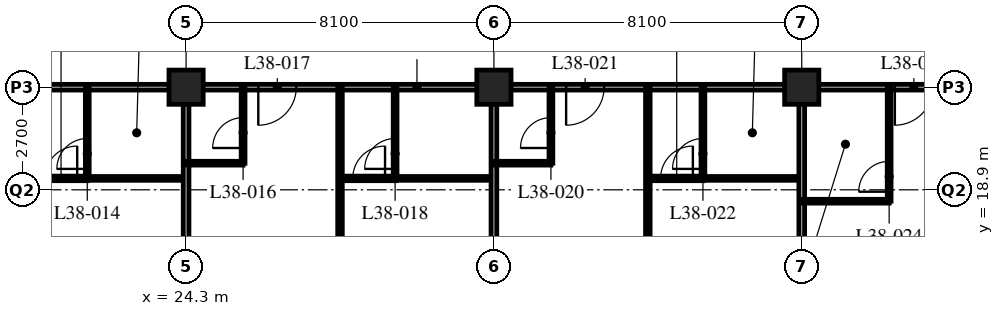
"""IFC4 building model, lengths in metres.
Left out: names, types, materials, properties, quantities, classifications, styles, units other than length and angle.
Written with IfcOpenShell. Run it as: python <this file> out.ifc"""

import sys

from ifc_helpers import new_model, si_unit, direction, frame, frame_2d, origin, origin_2d, place, context, subcontext, project, spatial, rectangle, hollow_rectangle, extrude, element, fill, save


model = new_model("IFC4")
c1 = context("Model", 3, precision=1e-05, world=origin(), true_north=direction((0.0, 1.0)))
c2 = subcontext(c1, "Body", "Model", "MODEL_VIEW")
j1 = project(units=[si_unit("LENGTHUNIT", "METRE"), si_unit("PLANEANGLEUNIT", "RADIAN")], contexts=[c1])
p1 = place(None, origin())
s1 = spatial("IfcSite", under=j1, at=p1, CompositionType="ELEMENT")
p2 = place(p1, origin())
s2 = spatial("IfcBuilding", under=s1, at=p2, CompositionType="ELEMENT")
p3 = place(p2, frame((0.0, 0.0, 147.6)))
s3 = spatial("IfcBuildingStorey", under=s2, at=p3, CompositionType="ELEMENT", Elevation=147.6)
for number, where, z_axis, x_axis in (
    (1, (24.3, 21.6, 0.0), (0.0, 0.0, 1.0), (1.0, 0.0, 0.0)),
    (2, (32.4, 21.6, 0.0), (0.0, 0.0, 1.0), (1.0, 0.0, 0.0)),
    (3, (40.5, 21.6, 0.0), (0.0, 0.0, 1.0), (1.0, 0.0, 0.0)),
):
    element("IfcColumn", number, at=place(p3, frame(where, z_axis=z_axis, x_axis=x_axis)), inside=s3, PredefinedType="COLUMN", context=c2, shape_type="SweptSolid", body=[
        extrude(hollow_rectangle(XDim=0.9, YDim=0.9, WallThickness=0.1, at=origin_2d()), origin(), (0.0, 0.0, 1.0), 3.4),
    ])
p4 = place(p3, frame((12.15, 21.6, 0.0), z_axis=(0.0, 0.0, 1.0), x_axis=(1.0, 0.0, 0.0)))
e4 = element("IfcWall", 4, at=p4, inside=s3, PredefinedType="PARTITIONING", context=c2, shape_type="SweptSolid", body=[
    extrude(rectangle(XDim=36.45, YDim=0.15, at=frame_2d((18.225, 0.0))), origin(), (0.0, 0.0, 1.0), 2.42),
])
p5 = place(p4, frame((5.95, 0.0, 0.0)))
e5 = element("IfcOpeningElement", 5, at=p5, cuts=e4, PredefinedType="OPENING", context=c2, shape_type="SweptSolid", body=[
    extrude(rectangle(XDim=1.0, YDim=2.1, at=frame_2d((0.5, 1.05))), frame((0.0, 0.085, 0.0), z_axis=(0.0, -1.0, 0.0), x_axis=(1.0, 0.0, 0.0)), (0.0, 0.0, 1.0), 0.17),
])
p6 = place(p4, frame((14.05, 0.0, 0.0)))
e6 = element("IfcOpeningElement", 6, at=p6, cuts=e4, PredefinedType="OPENING", context=c2, shape_type="SweptSolid", body=[
    extrude(rectangle(XDim=1.0, YDim=2.1, at=frame_2d((0.5, 1.05))), frame((0.0, 0.085, 0.0), z_axis=(0.0, -1.0, 0.0), x_axis=(1.0, 0.0, 0.0)), (0.0, 0.0, 1.0), 0.17),
])
p7 = place(p4, frame((22.15, 0.0, 0.0)))
e7 = element("IfcOpeningElement", 7, at=p7, cuts=e4, PredefinedType="OPENING", context=c2, shape_type="SweptSolid", body=[
    extrude(rectangle(XDim=1.0, YDim=2.1, at=frame_2d((0.5, 1.05))), frame((0.0, 0.085, 0.0), z_axis=(0.0, -1.0, 0.0), x_axis=(1.0, 0.0, 0.0)), (0.0, 0.0, 1.0), 0.17),
])
p8 = place(p4, frame((30.8, 0.0, 0.0)))
e8 = element("IfcOpeningElement", 8, at=p8, cuts=e4, PredefinedType="OPENING", context=c2, shape_type="SweptSolid", body=[
    extrude(rectangle(XDim=1.0, YDim=2.1, at=frame_2d((0.5, 1.05))), frame((0.0, 0.085, 0.0), z_axis=(0.0, -1.0, 0.0), x_axis=(1.0, 0.0, 0.0)), (0.0, 0.0, 1.0), 0.17),
])
p9 = place(p4, frame((1.525, 0.0, 0.0)))
e9 = element("IfcOpeningElement", 9, at=p9, cuts=e4, PredefinedType="OPENING", context=c2, shape_type="SweptSolid", body=[
    extrude(rectangle(XDim=1.0, YDim=2.1, at=frame_2d((0.5, 1.05))), frame((0.0, 0.085, 0.0), z_axis=(0.0, -1.0, 0.0), x_axis=(1.0, 0.0, 0.0)), (0.0, 0.0, 1.0), 0.17),
])
p10 = place(p4, frame((33.925, 0.0, 0.0)))
e10 = element("IfcOpeningElement", 10, at=p10, cuts=e4, PredefinedType="OPENING", context=c2, shape_type="SweptSolid", body=[
    extrude(rectangle(XDim=1.0, YDim=2.1, at=frame_2d((0.5, 1.05))), frame((0.0, 0.085, 0.0), z_axis=(0.0, -1.0, 0.0), x_axis=(1.0, 0.0, 0.0)), (0.0, 0.0, 1.0), 0.17),
])
p11 = place(p3, frame((21.7, 19.2, 0.0), z_axis=(0.0, 0.0, 1.0), x_axis=(1.0, 0.0, 0.0)))
e11 = element("IfcWall", 11, at=p11, inside=s3, PredefinedType="PARTITIONING", context=c2, shape_type="SweptSolid", body=[
    extrude(rectangle(XDim=2.6, YDim=0.1, at=frame_2d((1.3, 0.0))), origin(), (0.0, 0.0, 1.0), 3.19),
])
p12 = place(p3, frame((21.7, 21.6, 0.0), z_axis=(0.0, 0.0, 1.0), x_axis=(0.0, -1.0, 0.0)))
e12 = element("IfcWall", 12, at=p12, inside=s3, PredefinedType="PARTITIONING", context=c2, shape_type="SweptSolid", body=[
    extrude(rectangle(XDim=2.4, YDim=0.1, at=frame_2d((1.2, 0.0))), origin(), (0.0, 0.0, 1.0), 3.19),
])
p13 = place(p12, frame((1.35, 0.0, 0.0)))
e13 = element("IfcOpeningElement", 13, at=p13, cuts=e12, PredefinedType="OPENING", context=c2, shape_type="SweptSolid", body=[
    extrude(rectangle(XDim=0.8, YDim=2.1, at=frame_2d((0.4, 1.05))), frame((0.0, 0.06, 0.0), z_axis=(0.0, -1.0, 0.0), x_axis=(1.0, 0.0, 0.0)), (0.0, 0.0, 1.0), 0.12),
])
p14 = place(p3, frame((24.3, 21.6, 0.0), z_axis=(0.0, 0.0, 1.0), x_axis=(0.0, -1.0, 0.0)))
e14 = element("IfcWall", 14, at=p14, inside=s3, PredefinedType="PARTITIONING", context=c2, shape_type="SweptSolid", body=[
    extrude(rectangle(XDim=15.9, YDim=0.15, at=frame_2d((7.95, 0.0))), origin(), (0.0, 0.0, 1.0), 2.42),
])
p15 = place(p3, frame((24.3, 19.6, 0.0), z_axis=(0.0, 0.0, 1.0), x_axis=(1.0, 0.0, 0.0)))
e15 = element("IfcWall", 15, at=p15, inside=s3, PredefinedType="PARTITIONING", context=c2, shape_type="SweptSolid", body=[
    extrude(rectangle(XDim=1.5, YDim=0.1, at=frame_2d((0.75, 0.0))), origin(), (0.0, 0.0, 1.0), 3.19),
])
p16 = place(p3, frame((25.8, 21.6, 0.0), z_axis=(0.0, 0.0, 1.0), x_axis=(0.0, -1.0, 0.0)))
e16 = element("IfcWall", 16, at=p16, inside=s3, PredefinedType="PARTITIONING", context=c2, shape_type="SweptSolid", body=[
    extrude(rectangle(XDim=2.0, YDim=0.1, at=frame_2d((1.0, 0.0))), origin(), (0.0, 0.0, 1.0), 3.19),
])
p17 = place(p16, frame((0.8, 0.0, 0.0)))
e17 = element("IfcOpeningElement", 17, at=p17, cuts=e16, PredefinedType="OPENING", context=c2, shape_type="SweptSolid", body=[
    extrude(rectangle(XDim=0.8, YDim=2.1, at=frame_2d((0.4, 1.05))), frame((0.0, 0.06, 0.0), z_axis=(0.0, -1.0, 0.0), x_axis=(1.0, 0.0, 0.0)), (0.0, 0.0, 1.0), 0.12),
])
p18 = place(p3, frame((29.8, 19.2, 0.0), z_axis=(0.0, 0.0, 1.0), x_axis=(1.0, 0.0, 0.0)))
e18 = element("IfcWall", 18, at=p18, inside=s3, PredefinedType="PARTITIONING", context=c2, shape_type="SweptSolid", body=[
    extrude(rectangle(XDim=2.6, YDim=0.1, at=frame_2d((1.3, 0.0))), origin(), (0.0, 0.0, 1.0), 3.19),
])
p19 = place(p3, frame((29.8, 21.6, 0.0), z_axis=(0.0, 0.0, 1.0), x_axis=(0.0, -1.0, 0.0)))
e19 = element("IfcWall", 19, at=p19, inside=s3, PredefinedType="PARTITIONING", context=c2, shape_type="SweptSolid", body=[
    extrude(rectangle(XDim=2.4, YDim=0.1, at=frame_2d((1.2, 0.0))), origin(), (0.0, 0.0, 1.0), 3.19),
])
p20 = place(p19, frame((1.35, 0.0, 0.0)))
e20 = element("IfcOpeningElement", 20, at=p20, cuts=e19, PredefinedType="OPENING", context=c2, shape_type="SweptSolid", body=[
    extrude(rectangle(XDim=0.8, YDim=2.1, at=frame_2d((0.4, 1.05))), frame((0.0, 0.06, 0.0), z_axis=(0.0, -1.0, 0.0), x_axis=(1.0, 0.0, 0.0)), (0.0, 0.0, 1.0), 0.12),
])
p21 = place(p3, frame((28.35, 21.6, 0.0), z_axis=(0.0, 0.0, 1.0), x_axis=(0.0, -1.0, 0.0)))
e21 = element("IfcWall", 21, at=p21, inside=s3, PredefinedType="PARTITIONING", context=c2, shape_type="SweptSolid", body=[
    extrude(rectangle(XDim=15.9, YDim=0.12, at=frame_2d((7.95, 0.0))), origin(), (0.0, 0.0, 1.0), 3.19),
])
p22 = place(p21, frame((8.875, 0.0, 0.0)))
e22 = element("IfcOpeningElement", 22, at=p22, cuts=e21, PredefinedType="OPENING", context=c2, shape_type="SweptSolid", body=[
    extrude(rectangle(XDim=0.85, YDim=2.1, at=frame_2d((0.425, 1.05))), frame((0.0, 0.07, 0.0), z_axis=(0.0, -1.0, 0.0), x_axis=(1.0, 0.0, 0.0)), (0.0, 0.0, 1.0), 0.14),
])
p23 = place(p3, frame((32.4, 21.6, 0.0), z_axis=(0.0, 0.0, 1.0), x_axis=(0.0, -1.0, 0.0)))
e23 = element("IfcWall", 23, at=p23, inside=s3, PredefinedType="PARTITIONING", context=c2, shape_type="SweptSolid", body=[
    extrude(rectangle(XDim=15.9, YDim=0.15, at=frame_2d((7.95, 0.0))), origin(), (0.0, 0.0, 1.0), 2.42),
])
p24 = place(p3, frame((32.4, 19.6, 0.0), z_axis=(0.0, 0.0, 1.0), x_axis=(1.0, 0.0, 0.0)))
e24 = element("IfcWall", 24, at=p24, inside=s3, PredefinedType="PARTITIONING", context=c2, shape_type="SweptSolid", body=[
    extrude(rectangle(XDim=1.5, YDim=0.1, at=frame_2d((0.75, 0.0))), origin(), (0.0, 0.0, 1.0), 3.19),
])
p25 = place(p3, frame((33.9, 21.6, 0.0), z_axis=(0.0, 0.0, 1.0), x_axis=(0.0, -1.0, 0.0)))
e25 = element("IfcWall", 25, at=p25, inside=s3, PredefinedType="PARTITIONING", context=c2, shape_type="SweptSolid", body=[
    extrude(rectangle(XDim=2.0, YDim=0.1, at=frame_2d((1.0, 0.0))), origin(), (0.0, 0.0, 1.0), 3.19),
])
p26 = place(p25, frame((0.8, 0.0, 0.0)))
e26 = element("IfcOpeningElement", 26, at=p26, cuts=e25, PredefinedType="OPENING", context=c2, shape_type="SweptSolid", body=[
    extrude(rectangle(XDim=0.8, YDim=2.1, at=frame_2d((0.4, 1.05))), frame((0.0, 0.06, 0.0), z_axis=(0.0, -1.0, 0.0), x_axis=(1.0, 0.0, 0.0)), (0.0, 0.0, 1.0), 0.12),
])
p27 = place(p3, frame((37.9, 19.2, 0.0), z_axis=(0.0, 0.0, 1.0), x_axis=(1.0, 0.0, 0.0)))
e27 = element("IfcWall", 27, at=p27, inside=s3, PredefinedType="PARTITIONING", context=c2, shape_type="SweptSolid", body=[
    extrude(rectangle(XDim=2.6, YDim=0.1, at=frame_2d((1.3, 0.0))), origin(), (0.0, 0.0, 1.0), 3.19),
])
p28 = place(p3, frame((37.9, 21.6, 0.0), z_axis=(0.0, 0.0, 1.0), x_axis=(0.0, -1.0, 0.0)))
e28 = element("IfcWall", 28, at=p28, inside=s3, PredefinedType="PARTITIONING", context=c2, shape_type="SweptSolid", body=[
    extrude(rectangle(XDim=2.4, YDim=0.1, at=frame_2d((1.2, 0.0))), origin(), (0.0, 0.0, 1.0), 3.19),
])
p29 = place(p28, frame((1.35, 0.0, 0.0)))
e29 = element("IfcOpeningElement", 29, at=p29, cuts=e28, PredefinedType="OPENING", context=c2, shape_type="SweptSolid", body=[
    extrude(rectangle(XDim=0.8, YDim=2.1, at=frame_2d((0.4, 1.05))), frame((0.0, 0.06, 0.0), z_axis=(0.0, -1.0, 0.0), x_axis=(1.0, 0.0, 0.0)), (0.0, 0.0, 1.0), 0.12),
])
p30 = place(p3, frame((36.45, 21.6, 0.0), z_axis=(0.0, 0.0, 1.0), x_axis=(0.0, -1.0, 0.0)))
e30 = element("IfcWall", 30, at=p30, inside=s3, PredefinedType="PARTITIONING", context=c2, shape_type="SweptSolid", body=[
    extrude(rectangle(XDim=15.9, YDim=0.12, at=frame_2d((7.95, 0.0))), origin(), (0.0, 0.0, 1.0), 3.19),
])
p31 = place(p30, frame((8.875, 0.0, 0.0)))
e31 = element("IfcOpeningElement", 31, at=p31, cuts=e30, PredefinedType="OPENING", context=c2, shape_type="SweptSolid", body=[
    extrude(rectangle(XDim=0.85, YDim=2.1, at=frame_2d((0.425, 1.05))), frame((0.0, 0.07, 0.0), z_axis=(0.0, -1.0, 0.0), x_axis=(1.0, 0.0, 0.0)), (0.0, 0.0, 1.0), 0.14),
])
p32 = place(p3, frame((40.5, 21.6, 0.0), z_axis=(0.0, 0.0, 1.0), x_axis=(0.0, -1.0, 0.0)))
e32 = element("IfcWall", 32, at=p32, inside=s3, PredefinedType="PARTITIONING", context=c2, shape_type="SweptSolid", body=[
    extrude(rectangle(XDim=15.9, YDim=0.15, at=frame_2d((7.95, 0.0))), origin(), (0.0, 0.0, 1.0), 2.42),
])
p33 = place(p3, frame((40.5, 18.6, 0.0), z_axis=(0.0, 0.0, 1.0), x_axis=(1.0, 0.0, 0.0)))
e33 = element("IfcWall", 33, at=p33, inside=s3, PredefinedType="PARTITIONING", context=c2, shape_type="SweptSolid", body=[
    extrude(rectangle(XDim=2.3, YDim=0.1, at=frame_2d((1.15, 0.0))), origin(), (0.0, 0.0, 1.0), 3.19),
])
p34 = place(p3, frame((42.8, 21.6, 0.0), z_axis=(0.0, 0.0, 1.0), x_axis=(0.0, -1.0, 0.0)))
e34 = element("IfcWall", 34, at=p34, inside=s3, PredefinedType="PARTITIONING", context=c2, shape_type="SweptSolid", body=[
    extrude(rectangle(XDim=3.0, YDim=0.1, at=frame_2d((1.5, 0.0))), origin(), (0.0, 0.0, 1.0), 3.19),
])
p35 = place(p34, frame((1.95, 0.0, 0.0)))
e35 = element("IfcOpeningElement", 35, at=p35, cuts=e34, PredefinedType="OPENING", context=c2, shape_type="SweptSolid", body=[
    extrude(rectangle(XDim=0.8, YDim=2.1, at=frame_2d((0.4, 1.05))), frame((0.0, 0.06, 0.0), z_axis=(0.0, -1.0, 0.0), x_axis=(1.0, 0.0, 0.0)), (0.0, 0.0, 1.0), 0.12),
])
p36 = place(p3, frame((21.71, 19.2, 0.0), z_axis=(0.0, 0.0, 1.0), x_axis=(-1.0, 0.0, 0.0)))
e36 = element("IfcWall", 36, at=p36, inside=s3, PredefinedType="PARTITIONING", context=c2, shape_type="SweptSolid", body=[
    extrude(rectangle(XDim=1.46, YDim=0.12, at=frame_2d((0.73, 0.0))), origin(), (0.0, 0.0, 1.0), 3.19),
])
p37 = place(p36, frame((0.275, 0.0, 0.0)))
e37 = element("IfcOpeningElement", 37, at=p37, cuts=e36, PredefinedType="OPENING", context=c2, shape_type="SweptSolid", body=[
    extrude(rectangle(XDim=0.85, YDim=2.1, at=frame_2d((0.425, 1.05))), frame((0.0, 0.07, 0.0), z_axis=(0.0, -1.0, 0.0), x_axis=(1.0, 0.0, 0.0)), (0.0, 0.0, 1.0), 0.14),
])
p38 = place(p3, frame((29.81, 19.2, 0.0), z_axis=(0.0, 0.0, 1.0), x_axis=(-1.0, 0.0, 0.0)))
e38 = element("IfcWall", 38, at=p38, inside=s3, PredefinedType="PARTITIONING", context=c2, shape_type="SweptSolid", body=[
    extrude(rectangle(XDim=1.46, YDim=0.12, at=frame_2d((0.73, 0.0))), origin(), (0.0, 0.0, 1.0), 3.19),
])
p39 = place(p38, frame((0.275, 0.0, 0.0)))
e39 = element("IfcOpeningElement", 39, at=p39, cuts=e38, PredefinedType="OPENING", context=c2, shape_type="SweptSolid", body=[
    extrude(rectangle(XDim=0.85, YDim=2.1, at=frame_2d((0.425, 1.05))), frame((0.0, 0.07, 0.0), z_axis=(0.0, -1.0, 0.0), x_axis=(1.0, 0.0, 0.0)), (0.0, 0.0, 1.0), 0.14),
])
p40 = place(p3, frame((37.91, 19.2, 0.0), z_axis=(0.0, 0.0, 1.0), x_axis=(-1.0, 0.0, 0.0)))
e40 = element("IfcWall", 40, at=p40, inside=s3, PredefinedType="PARTITIONING", context=c2, shape_type="SweptSolid", body=[
    extrude(rectangle(XDim=1.46, YDim=0.12, at=frame_2d((0.73, 0.0))), origin(), (0.0, 0.0, 1.0), 3.19),
])
p41 = place(p40, frame((0.275, 0.0, 0.0)))
e41 = element("IfcOpeningElement", 41, at=p41, cuts=e40, PredefinedType="OPENING", context=c2, shape_type="SweptSolid", body=[
    extrude(rectangle(XDim=0.85, YDim=2.1, at=frame_2d((0.425, 1.05))), frame((0.0, 0.07, 0.0), z_axis=(0.0, -1.0, 0.0), x_axis=(1.0, 0.0, 0.0)), (0.0, 0.0, 1.0), 0.14),
])
p42 = place(p13, origin())
e42 = element("IfcDoor", 42, at=p42, inside=s3, OperationType="SINGLE_SWING_LEFT", PredefinedType="DOOR", context=c2, shape_type="SweptSolid", body=[
    extrude(rectangle(XDim=0.8, YDim=2.1, at=frame_2d((0.4, 1.05))), frame((0.0, 0.025, 0.0), z_axis=(0.0, -1.0, 0.0), x_axis=(1.0, 0.0, 0.0)), (0.0, 0.0, 1.0), 0.05),
])
fill(e13, e42)
p43 = place(p17, origin())
e43 = element("IfcDoor", 43, at=p43, inside=s3, OperationType="SINGLE_SWING_LEFT", PredefinedType="DOOR", context=c2, shape_type="SweptSolid", body=[
    extrude(rectangle(XDim=0.8, YDim=2.1, at=frame_2d((0.4, 1.05))), frame((0.0, 0.025, 0.0), z_axis=(0.0, -1.0, 0.0), x_axis=(1.0, 0.0, 0.0)), (0.0, 0.0, 1.0), 0.05),
])
fill(e17, e43)
p44 = place(p6, origin())
e44 = element("IfcDoor", 44, at=p44, inside=s3, OperationType="SINGLE_SWING_RIGHT", PredefinedType="DOOR", context=c2, shape_type="SweptSolid", body=[
    extrude(rectangle(XDim=1.0, YDim=2.1, at=frame_2d((0.5, 1.05))), frame((0.0, 0.025, 0.0), z_axis=(0.0, -1.0, 0.0), x_axis=(1.0, 0.0, 0.0)), (0.0, 0.0, 1.0), 0.05),
])
fill(e6, e44)
p45 = place(p20, origin())
e45 = element("IfcDoor", 45, at=p45, inside=s3, OperationType="SINGLE_SWING_LEFT", PredefinedType="DOOR", context=c2, shape_type="SweptSolid", body=[
    extrude(rectangle(XDim=0.8, YDim=2.1, at=frame_2d((0.4, 1.05))), frame((0.0, 0.025, 0.0), z_axis=(0.0, -1.0, 0.0), x_axis=(1.0, 0.0, 0.0)), (0.0, 0.0, 1.0), 0.05),
])
fill(e20, e45)
p46 = place(p26, origin())
e46 = element("IfcDoor", 46, at=p46, inside=s3, OperationType="SINGLE_SWING_LEFT", PredefinedType="DOOR", context=c2, shape_type="SweptSolid", body=[
    extrude(rectangle(XDim=0.8, YDim=2.1, at=frame_2d((0.4, 1.05))), frame((0.0, 0.025, 0.0), z_axis=(0.0, -1.0, 0.0), x_axis=(1.0, 0.0, 0.0)), (0.0, 0.0, 1.0), 0.05),
])
fill(e26, e46)
p47 = place(p7, origin())
e47 = element("IfcDoor", 47, at=p47, inside=s3, OperationType="SINGLE_SWING_RIGHT", PredefinedType="DOOR", context=c2, shape_type="SweptSolid", body=[
    extrude(rectangle(XDim=1.0, YDim=2.1, at=frame_2d((0.5, 1.05))), frame((0.0, 0.025, 0.0), z_axis=(0.0, -1.0, 0.0), x_axis=(1.0, 0.0, 0.0)), (0.0, 0.0, 1.0), 0.05),
])
fill(e7, e47)
p48 = place(p29, origin())
e48 = element("IfcDoor", 48, at=p48, inside=s3, OperationType="SINGLE_SWING_LEFT", PredefinedType="DOOR", context=c2, shape_type="SweptSolid", body=[
    extrude(rectangle(XDim=0.8, YDim=2.1, at=frame_2d((0.4, 1.05))), frame((0.0, 0.025, 0.0), z_axis=(0.0, -1.0, 0.0), x_axis=(1.0, 0.0, 0.0)), (0.0, 0.0, 1.0), 0.05),
])
fill(e29, e48)
p49 = place(p35, origin())
e49 = element("IfcDoor", 49, at=p49, inside=s3, OperationType="SINGLE_SWING_LEFT", PredefinedType="DOOR", context=c2, shape_type="SweptSolid", body=[
    extrude(rectangle(XDim=0.8, YDim=2.1, at=frame_2d((0.4, 1.05))), frame((0.0, 0.025, 0.0), z_axis=(0.0, -1.0, 0.0), x_axis=(1.0, 0.0, 0.0)), (0.0, 0.0, 1.0), 0.05),
])
fill(e35, e49)
p50 = place(p8, origin())
e50 = element("IfcDoor", 50, at=p50, inside=s3, OperationType="SINGLE_SWING_RIGHT", PredefinedType="DOOR", context=c2, shape_type="SweptSolid", body=[
    extrude(rectangle(XDim=1.0, YDim=2.1, at=frame_2d((0.5, 1.05))), frame((0.0, 0.025, 0.0), z_axis=(0.0, -1.0, 0.0), x_axis=(1.0, 0.0, 0.0)), (0.0, 0.0, 1.0), 0.05),
])
fill(e8, e50)
p51 = place(p37, origin())
e51 = element("IfcDoor", 51, at=p51, inside=s3, OperationType="SINGLE_SWING_RIGHT", PredefinedType="DOOR", context=c2, shape_type="SweptSolid", body=[
    extrude(rectangle(XDim=0.85, YDim=2.1, at=frame_2d((0.425, 1.05))), frame((0.0, 0.025, 0.0), z_axis=(0.0, -1.0, 0.0), x_axis=(1.0, 0.0, 0.0)), (0.0, 0.0, 1.0), 0.05),
])
fill(e37, e51)
p52 = place(p39, origin())
e52 = element("IfcDoor", 52, at=p52, inside=s3, OperationType="SINGLE_SWING_RIGHT", PredefinedType="DOOR", context=c2, shape_type="SweptSolid", body=[
    extrude(rectangle(XDim=0.85, YDim=2.1, at=frame_2d((0.425, 1.05))), frame((0.0, 0.025, 0.0), z_axis=(0.0, -1.0, 0.0), x_axis=(1.0, 0.0, 0.0)), (0.0, 0.0, 1.0), 0.05),
])
fill(e39, e52)
p53 = place(p41, origin())
e53 = element("IfcDoor", 53, at=p53, inside=s3, OperationType="SINGLE_SWING_RIGHT", PredefinedType="DOOR", context=c2, shape_type="SweptSolid", body=[
    extrude(rectangle(XDim=0.85, YDim=2.1, at=frame_2d((0.425, 1.05))), frame((0.0, 0.025, 0.0), z_axis=(0.0, -1.0, 0.0), x_axis=(1.0, 0.0, 0.0)), (0.0, 0.0, 1.0), 0.05),
])
fill(e41, e53)
save(model, sys.argv[1])
